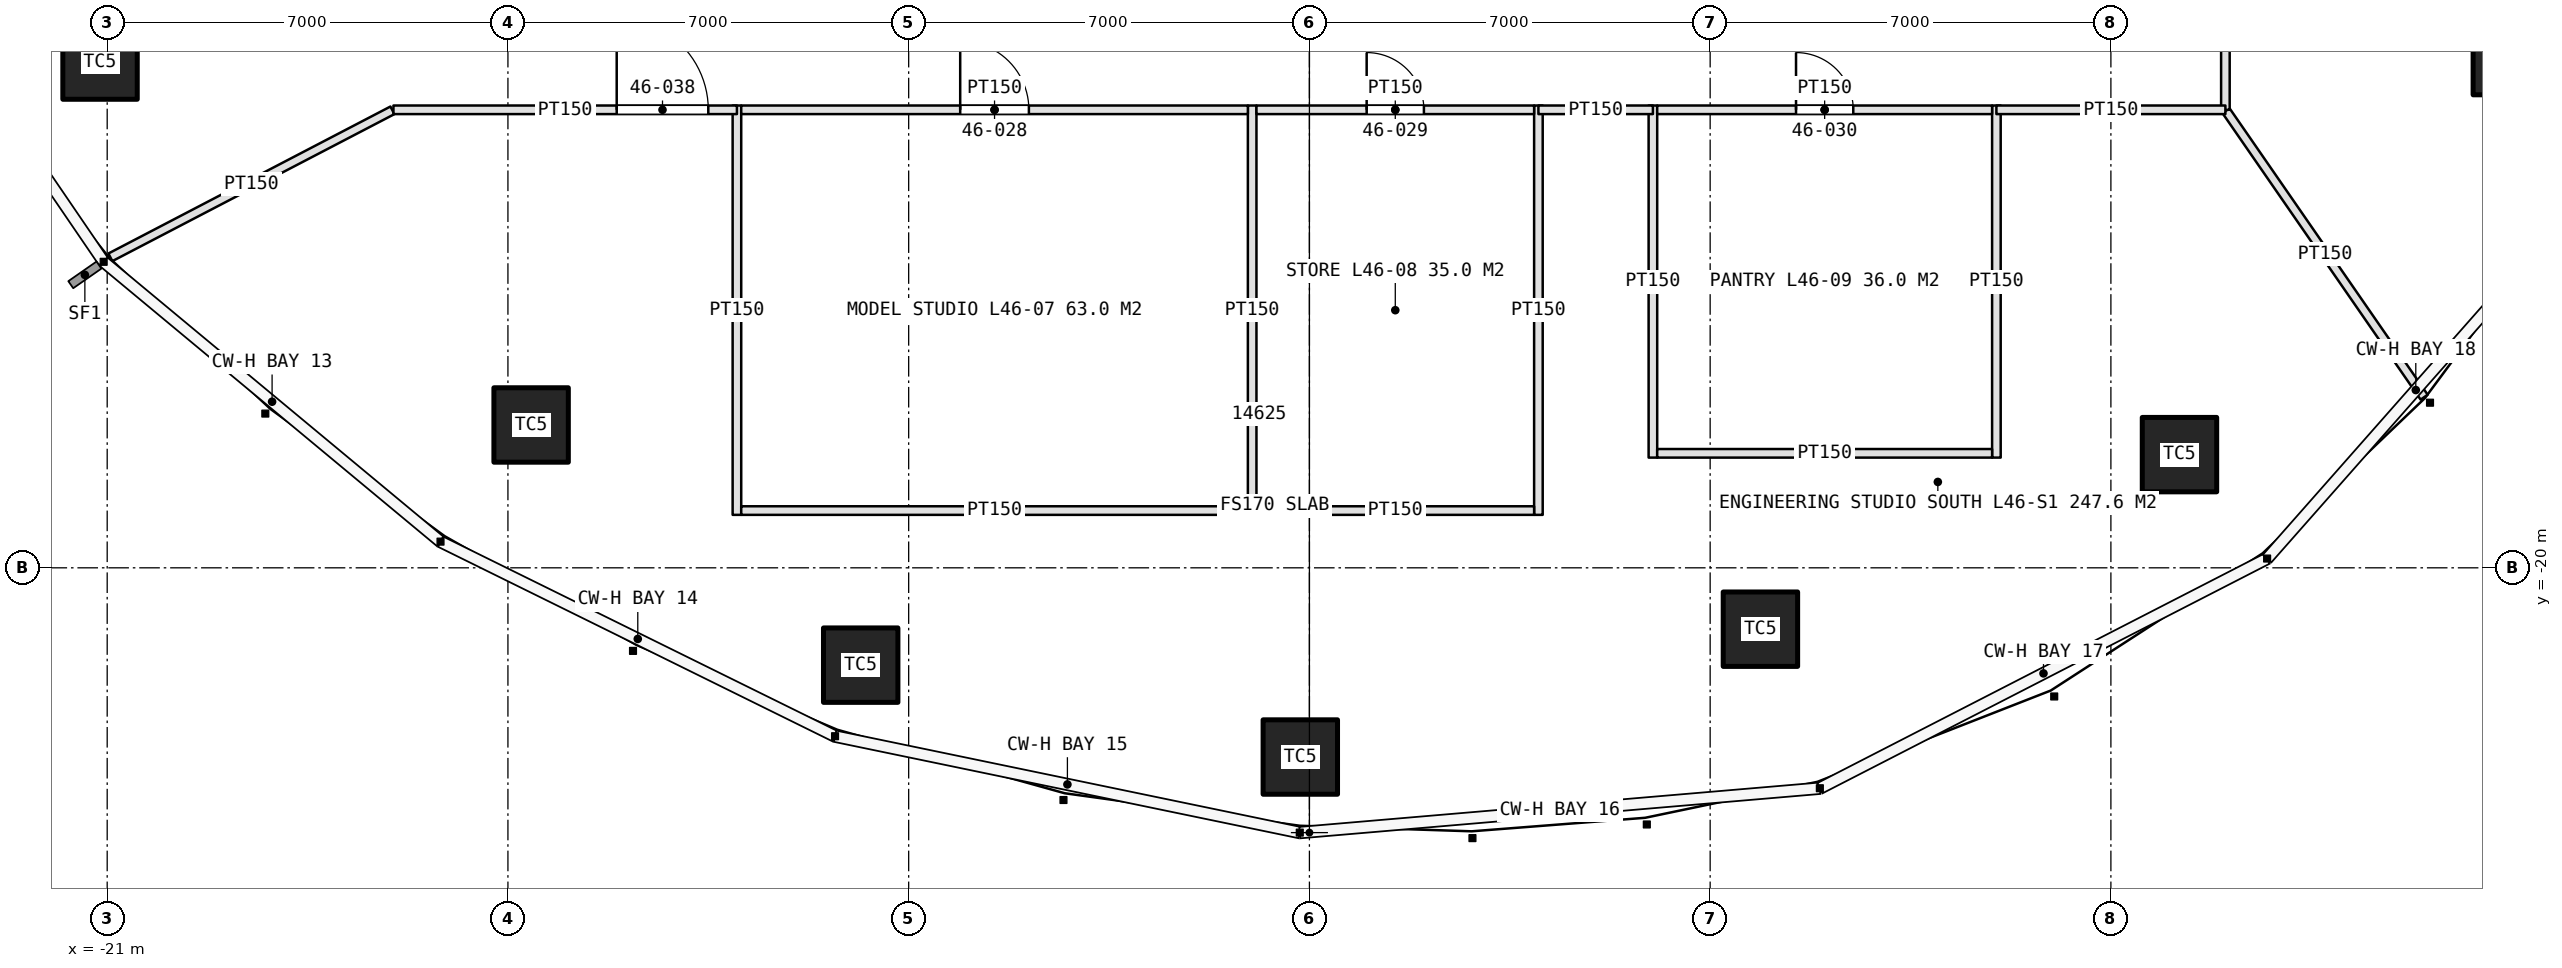
"""IFC4 building model, lengths in metres.
Left out: names, types, materials, properties, quantities, classifications, styles, units other than length and angle.
Written with IfcOpenShell. Run it as: python <this file> out.ifc"""

import sys

from ifc_helpers import new_model, si_unit, direction, frame, frame_2d, origin, origin_2d, place, context, subcontext, project, spatial, rectangle, extrude, element, fill, save


model = new_model("IFC4")
c1 = context("Model", 3, precision=1e-05, world=origin(), true_north=direction((0.0, 1.0)))
c2 = subcontext(c1, "Body", "Model", "MODEL_VIEW")
j1 = project(units=[si_unit("LENGTHUNIT", "METRE"), si_unit("PLANEANGLEUNIT", "RADIAN")], contexts=[c1])
p1 = place(None, origin())
s1 = spatial("IfcSite", under=j1, at=p1, CompositionType="ELEMENT")
p2 = place(p1, origin())
s2 = spatial("IfcBuilding", under=s1, at=p2, CompositionType="ELEMENT")
p3 = place(p2, frame((0.0, 0.0, 211.6)))
s3 = spatial("IfcBuildingStorey", under=s2, at=p3, CompositionType="ELEMENT", Elevation=211.6)
for number, where, z_axis, x_axis in (
    (1, (-21.125, -11.166, 0.0), (0.0, 0.0, 1.0), (1.0, 0.0, 0.0)),
    (2, (-13.595, -17.505, 0.0), (0.0, 0.0, 1.0), (1.0, 0.0, 0.0)),
    (3, (-7.838, -21.7, 0.0), (0.0, 0.0, 1.0), (1.0, 0.0, 0.0)),
    (4, (-0.159, -23.305, 0.0), (0.0, 0.0, 1.0), (1.0, 0.0, 0.0)),
    (5, (7.878, -21.072, 0.0), (0.0, 0.0, 1.0), (1.0, 0.0, 0.0)),
    (6, (15.198, -18.023, 0.0), (0.0, 0.0, 1.0), (1.0, 0.0, 0.0)),
    (7, (20.977, -11.088, 0.0), (0.0, 0.0, 1.0), (1.0, 0.0, 0.0)),
):
    element("IfcColumn", number, at=place(p3, frame(where, z_axis=z_axis, x_axis=x_axis)), inside=s3, PredefinedType="COLUMN", context=c2, shape_type="SweptSolid", body=[
        extrude(rectangle(XDim=1.3, YDim=1.3, at=origin_2d()), origin(), (0.0, 0.0, 1.0), 4.2),
    ])
for number, where, z_axis, x_axis in (
    (8, (-10.0, -11.925, 0.0), (0.0, 0.0, 1.0), (0.0, -1.0, 0.0)),
    (9, (-1.0, -11.925, 0.0), (0.0, 0.0, 1.0), (0.0, -1.0, 0.0)),
    (10, (4.0, -11.925, 0.0), (0.0, 0.0, 1.0), (0.0, -1.0, 0.0)),
):
    element("IfcWall", number, at=place(p3, frame(where, z_axis=z_axis, x_axis=x_axis)), inside=s3, PredefinedType="PARTITIONING", context=c2, shape_type="SweptSolid", body=[
        extrude(rectangle(XDim=7.15, YDim=0.15, at=frame_2d((3.575, 0.0))), origin(), (0.0, 0.0, 1.0), 3.0),
    ])
p4 = place(p3, frame((-9.925, -12.0, 0.0), z_axis=(0.0, 0.0, 1.0), x_axis=(1.0, 0.0, 0.0)))
e11 = element("IfcWall", 11, at=p4, inside=s3, PredefinedType="PARTITIONING", context=c2, shape_type="SweptSolid", body=[
    extrude(rectangle(XDim=8.85, YDim=0.15, at=frame_2d((4.425, 0.0))), origin(), (0.0, 0.0, 1.0), 3.0),
])
p5 = place(p4, frame((3.825, 0.0, 0.0)))
e12 = element("IfcOpeningElement", 12, at=p5, cuts=e11, PredefinedType="OPENING", context=c2, shape_type="SweptSolid", body=[
    extrude(rectangle(XDim=1.2, YDim=2.4, at=frame_2d((0.6, 1.2))), frame((0.0, 0.085, 0.0), z_axis=(0.0, -1.0, 0.0), x_axis=(1.0, 0.0, 0.0)), (0.0, 0.0, 1.0), 0.17),
])
p6 = place(p3, frame((-9.925, -19.0, 0.0), z_axis=(0.0, 0.0, 1.0), x_axis=(1.0, 0.0, 0.0)))
e13 = element("IfcWall", 13, at=p6, inside=s3, PredefinedType="PARTITIONING", context=c2, shape_type="SweptSolid", body=[
    extrude(rectangle(XDim=8.85, YDim=0.15, at=frame_2d((4.425, 0.0))), origin(), (0.0, 0.0, 1.0), 3.0),
])
p7 = place(p3, frame((-0.925, -12.0, 0.0), z_axis=(0.0, 0.0, 1.0), x_axis=(1.0, 0.0, 0.0)))
e14 = element("IfcWall", 14, at=p7, inside=s3, PredefinedType="PARTITIONING", context=c2, shape_type="SweptSolid", body=[
    extrude(rectangle(XDim=4.85, YDim=0.15, at=frame_2d((2.425, 0.0))), origin(), (0.0, 0.0, 1.0), 3.0),
])
p8 = place(p7, frame((1.925, 0.0, 0.0)))
e15 = element("IfcOpeningElement", 15, at=p8, cuts=e14, PredefinedType="OPENING", context=c2, shape_type="SweptSolid", body=[
    extrude(rectangle(XDim=1.0, YDim=2.2, at=frame_2d((0.5, 1.1))), frame((0.0, 0.085, 0.0), z_axis=(0.0, -1.0, 0.0), x_axis=(1.0, 0.0, 0.0)), (0.0, 0.0, 1.0), 0.17),
])
p9 = place(p3, frame((-0.925, -19.0, 0.0), z_axis=(0.0, 0.0, 1.0), x_axis=(1.0, 0.0, 0.0)))
e16 = element("IfcWall", 16, at=p9, inside=s3, PredefinedType="PARTITIONING", context=c2, shape_type="SweptSolid", body=[
    extrude(rectangle(XDim=4.85, YDim=0.15, at=frame_2d((2.425, 0.0))), origin(), (0.0, 0.0, 1.0), 3.0),
])
for number, where, z_axis, x_axis in (
    (17, (6.0, -11.925, 0.0), (0.0, 0.0, 1.0), (0.0, -1.0, 0.0)),
    (18, (12.0, -11.925, 0.0), (0.0, 0.0, 1.0), (0.0, -1.0, 0.0)),
):
    element("IfcWall", number, at=place(p3, frame(where, z_axis=z_axis, x_axis=x_axis)), inside=s3, PredefinedType="PARTITIONING", context=c2, shape_type="SweptSolid", body=[
        extrude(rectangle(XDim=6.15, YDim=0.15, at=frame_2d((3.075, 0.0))), origin(), (0.0, 0.0, 1.0), 3.0),
    ])
p10 = place(p3, frame((6.075, -12.0, 0.0), z_axis=(0.0, 0.0, 1.0), x_axis=(1.0, 0.0, 0.0)))
e19 = element("IfcWall", 19, at=p10, inside=s3, PredefinedType="PARTITIONING", context=c2, shape_type="SweptSolid", body=[
    extrude(rectangle(XDim=5.85, YDim=0.15, at=frame_2d((2.925, 0.0))), origin(), (0.0, 0.0, 1.0), 3.0),
])
p11 = place(p10, frame((2.425, 0.0, 0.0)))
e20 = element("IfcOpeningElement", 20, at=p11, cuts=e19, PredefinedType="OPENING", context=c2, shape_type="SweptSolid", body=[
    extrude(rectangle(XDim=1.0, YDim=2.2, at=frame_2d((0.5, 1.1))), frame((0.0, 0.085, 0.0), z_axis=(0.0, -1.0, 0.0), x_axis=(1.0, 0.0, 0.0)), (0.0, 0.0, 1.0), 0.17),
])
p12 = place(p3, frame((6.075, -18.0, 0.0), z_axis=(0.0, 0.0, 1.0), x_axis=(1.0, 0.0, 0.0)))
e21 = element("IfcWall", 21, at=p12, inside=s3, PredefinedType="PARTITIONING", context=c2, shape_type="SweptSolid", body=[
    extrude(rectangle(XDim=5.85, YDim=0.15, at=frame_2d((2.925, 0.0))), origin(), (0.0, 0.0, 1.0), 3.0),
])
p13 = place(p3, frame((-16.018, -12.009, 0.0), z_axis=(0.0, 0.0, 1.0), x_axis=(-0.886831549241, -0.462092851351, 0.0)))
e22 = element("IfcWall", 22, at=p13, inside=s3, PredefinedType="PARTITIONING", context=c2, shape_type="SweptSolid", body=[
    extrude(rectangle(XDim=5.555, YDim=0.15, at=frame_2d((2.778, 0.0))), origin(), (0.0, 0.0, 1.0), 3.0),
])
p14 = place(p3, frame((16.011, -12.016, 0.0), z_axis=(0.0, 0.0, 1.0), x_axis=(0.568863489071, -0.822431961199, 0.0)))
e23 = element("IfcWall", 23, at=p14, inside=s3, PredefinedType="PARTITIONING", context=c2, shape_type="SweptSolid", body=[
    extrude(rectangle(XDim=6.083, YDim=0.15, at=frame_2d((3.042, 0.0))), origin(), (0.0, 0.0, 1.0), 3.0),
])
p15 = place(p3, frame((16.0, -12.0, 0.0), z_axis=(0.0, 0.0, 1.0), x_axis=(0.0, 1.0, 0.0)))
e24 = element("IfcWall", 24, at=p15, inside=s3, PredefinedType="PARTITIONING", context=c2, shape_type="SweptSolid", body=[
    extrude(rectangle(XDim=6.0, YDim=0.15, at=frame_2d((3.0, 0.0))), origin(), (0.0, 0.0, 1.0), 3.0),
])
p16 = place(p15, frame((3.9, 0.0, 0.0)))
e25 = element("IfcOpeningElement", 25, at=p16, cuts=e24, PredefinedType="OPENING", context=c2, shape_type="SweptSolid", body=[
    extrude(rectangle(XDim=1.6, YDim=2.4, at=frame_2d((0.8, 1.2))), frame((0.0, 0.085, 0.0), z_axis=(0.0, -1.0, 0.0), x_axis=(1.0, 0.0, 0.0)), (0.0, 0.0, 1.0), 0.17),
])
p17 = place(p3, frame((-16.0, -12.0, 0.0), z_axis=(0.0, 0.0, 1.0), x_axis=(1.0, 0.0, 0.0)))
e26 = element("IfcWall", 26, at=p17, inside=s3, PredefinedType="PARTITIONING", context=c2, shape_type="SweptSolid", body=[
    extrude(rectangle(XDim=6.0, YDim=0.15, at=frame_2d((3.0, 0.0))), origin(), (0.0, 0.0, 1.0), 3.0),
])
p18 = place(p17, frame((3.9, 0.0, 0.0)))
e27 = element("IfcOpeningElement", 27, at=p18, cuts=e26, PredefinedType="OPENING", context=c2, shape_type="SweptSolid", body=[
    extrude(rectangle(XDim=1.6, YDim=2.4, at=frame_2d((0.8, 1.2))), frame((0.0, 0.085, 0.0), z_axis=(0.0, -1.0, 0.0), x_axis=(1.0, 0.0, 0.0)), (0.0, 0.0, 1.0), 0.17),
])
p19 = place(p3, frame((4.0, -12.0, 0.0), z_axis=(0.0, 0.0, 1.0), x_axis=(1.0, 0.0, 0.0)))
e28 = element("IfcWall", 28, at=p19, inside=s3, PredefinedType="PARTITIONING", context=c2, shape_type="SweptSolid", body=[
    extrude(rectangle(XDim=2.0, YDim=0.15, at=frame_2d((1.0, 0.0))), origin(), (0.0, 0.0, 1.0), 3.0),
])
p20 = place(p3, frame((12.0, -12.0, 0.0), z_axis=(0.0, 0.0, 1.0), x_axis=(1.0, 0.0, 0.0)))
e29 = element("IfcWall", 29, at=p20, inside=s3, PredefinedType="PARTITIONING", context=c2, shape_type="SweptSolid", body=[
    extrude(rectangle(XDim=4.0, YDim=0.15, at=frame_2d((2.0, 0.0))), origin(), (0.0, 0.0, 1.0), 3.0),
])
p21 = place(p5, origin())
e30 = element("IfcDoor", 30, at=p21, inside=s3, OperationType="SINGLE_SWING_LEFT", PredefinedType="DOOR", context=c2, shape_type="SweptSolid", body=[
    extrude(rectangle(XDim=1.2, YDim=2.4, at=frame_2d((0.6, 1.2))), frame((0.0, 0.025, 0.0), z_axis=(0.0, -1.0, 0.0), x_axis=(1.0, 0.0, 0.0)), (0.0, 0.0, 1.0), 0.05),
])
fill(e12, e30)
p22 = place(p8, origin())
e31 = element("IfcDoor", 31, at=p22, inside=s3, OperationType="SINGLE_SWING_LEFT", PredefinedType="DOOR", context=c2, shape_type="SweptSolid", body=[
    extrude(rectangle(XDim=1.0, YDim=2.2, at=frame_2d((0.5, 1.1))), frame((0.0, 0.025, 0.0), z_axis=(0.0, -1.0, 0.0), x_axis=(1.0, 0.0, 0.0)), (0.0, 0.0, 1.0), 0.05),
])
fill(e15, e31)
p23 = place(p11, origin())
e32 = element("IfcDoor", 32, at=p23, inside=s3, OperationType="SINGLE_SWING_LEFT", PredefinedType="DOOR", context=c2, shape_type="SweptSolid", body=[
    extrude(rectangle(XDim=1.0, YDim=2.2, at=frame_2d((0.5, 1.1))), frame((0.0, 0.025, 0.0), z_axis=(0.0, -1.0, 0.0), x_axis=(1.0, 0.0, 0.0)), (0.0, 0.0, 1.0), 0.05),
])
fill(e20, e32)
p24 = place(p18, origin())
e33 = element("IfcDoor", 33, at=p24, inside=s3, OperationType="DOUBLE_DOOR_SINGLE_SWING", PredefinedType="DOOR", context=c2, shape_type="SweptSolid", body=[
    extrude(rectangle(XDim=1.6, YDim=2.4, at=frame_2d((0.8, 1.2))), frame((0.0, 0.025, 0.0), z_axis=(0.0, -1.0, 0.0), x_axis=(1.0, 0.0, 0.0)), (0.0, 0.0, 1.0), 0.05),
])
fill(e27, e33)
save(model, sys.argv[1])
